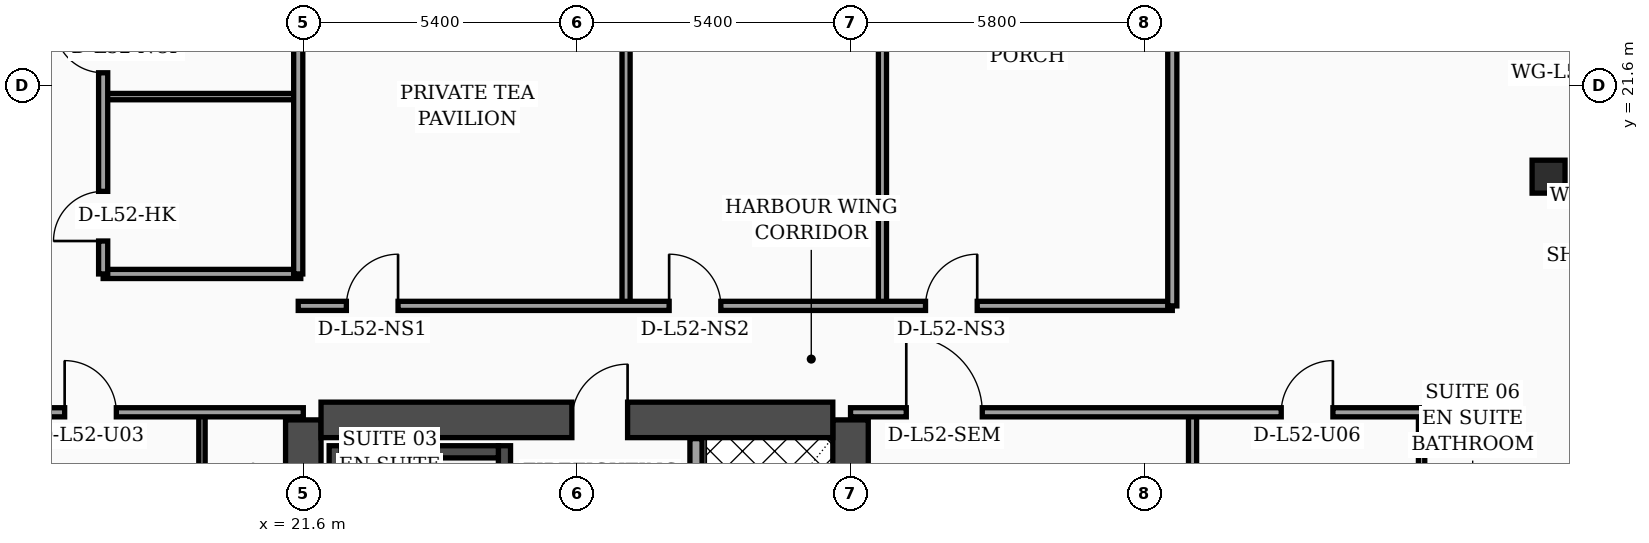
"""IFC4 building model, lengths in metres.
Left out: names, types, materials, properties, quantities, classifications, styles, units other than length and angle.
Written with IfcOpenShell. Run it as: python <this file> out.ifc"""

import sys

from ifc_helpers import new_model, si_unit, direction, frame, frame_2d, origin, origin_2d, place, context, subcontext, project, spatial, rectangle, hollow_rectangle, extrude, element, fill, save


model = new_model("IFC4")
c1 = context("Model", 3, precision=1e-05, world=origin(), true_north=direction((0.0, 1.0)))
c2 = subcontext(c1, "Body", "Model", "MODEL_VIEW")
j1 = project(units=[si_unit("LENGTHUNIT", "METRE"), si_unit("PLANEANGLEUNIT", "RADIAN")], contexts=[c1])
p1 = place(None, origin())
s1 = spatial("IfcSite", under=j1, at=p1, CompositionType="ELEMENT")
p2 = place(p1, origin())
s2 = spatial("IfcBuilding", under=s1, at=p2, CompositionType="ELEMENT")
p3 = place(p2, frame((0.0, 0.0, 211.0)))
s3 = spatial("IfcBuildingStorey", under=s2, at=p3, CompositionType="ELEMENT", Elevation=211.0)
for number, where, z_axis, x_axis in (
    (1, (21.6, 4.6, 0.0), (0.0, 0.0, 1.0), (0.0, 1.0, 0.0)),
    (2, (32.4, 4.6, 0.0), (0.0, 0.0, 1.0), (0.0, 1.0, 0.0)),
):
    element("IfcWall", number, at=place(p3, frame(where, z_axis=z_axis, x_axis=x_axis)), inside=s3, PredefinedType="SHEAR", context=c2, shape_type="SweptSolid", body=[
        extrude(rectangle(XDim=10.4, YDim=0.7, at=frame_2d((5.2, 0.0))), origin(), (0.0, 0.0, 1.0), 3.56),
    ])
p4 = place(p3, frame((21.95, 15.0, 0.0), z_axis=(0.0, 0.0, 1.0), x_axis=(1.0, 0.0, 0.0)))
e3 = element("IfcWall", 3, at=p4, inside=s3, PredefinedType="SHEAR", context=c2, shape_type="SweptSolid", body=[
    extrude(rectangle(XDim=10.1, YDim=0.7, at=frame_2d((5.05, 0.0))), origin(), (0.0, 0.0, 1.0), 3.56),
])
p5 = place(p4, frame((4.95, 0.0, 0.0)))
e4 = element("IfcOpeningElement", 4, at=p5, cuts=e3, PredefinedType="OPENING", context=c2, shape_type="SweptSolid", body=[
    extrude(rectangle(XDim=1.1, YDim=2.2, at=frame_2d((0.55, 1.1))), frame((0.0, 0.36, 0.0), z_axis=(0.0, -1.0, 0.0), x_axis=(1.0, 0.0, 0.0)), (0.0, 0.0, 1.0), 0.72),
])
p6 = place(p3, frame((22.23, 4.95, 0.0), z_axis=(0.0, 0.0, 1.0), x_axis=(0.0, 1.0, 0.0)))
e5 = element("IfcWall", 5, at=p6, inside=s3, PredefinedType="SOLIDWALL", context=c2, shape_type="SweptSolid", body=[
    extrude(rectangle(XDim=9.54, YDim=0.24, at=frame_2d((4.77, 0.0))), origin(), (0.0, 0.0, 1.0), 3.56),
])
p7 = place(p3, frame((25.57, 4.95, 0.0), z_axis=(0.0, 0.0, 1.0), x_axis=(0.0, 1.0, 0.0)))
e6 = element("IfcWall", 6, at=p7, inside=s3, PredefinedType="SOLIDWALL", context=c2, shape_type="SweptSolid", body=[
    extrude(rectangle(XDim=9.54, YDim=0.24, at=frame_2d((4.77, 0.0))), origin(), (0.0, 0.0, 1.0), 3.56),
])
p8 = place(p7, frame((0.35, 0.0, 0.0)))
e7 = element("IfcOpeningElement", 7, at=p8, cuts=e6, PredefinedType="OPENING", context=c2, shape_type="SweptSolid", body=[
    extrude(rectangle(XDim=1.15, YDim=2.2, at=frame_2d((0.575, 1.1))), frame((0.0, 0.13, 0.0), z_axis=(0.0, -1.0, 0.0), x_axis=(1.0, 0.0, 0.0)), (0.0, 0.0, 1.0), 0.26),
])
p9 = place(p3, frame((22.35, 14.37, 0.0), z_axis=(0.0, 0.0, 1.0), x_axis=(1.0, 0.0, 0.0)))
e8 = element("IfcWall", 8, at=p9, inside=s3, PredefinedType="SOLIDWALL", context=c2, shape_type="SweptSolid", body=[
    extrude(rectangle(XDim=3.1, YDim=0.24, at=frame_2d((1.55, 0.0))), origin(), (0.0, 0.0, 1.0), 3.56),
])
p10 = place(p3, frame((46.176, 19.8, 0.0), z_axis=(0.0, 0.0, 1.0), x_axis=(1.0, 0.0, 0.0)))
e9 = element("IfcColumn", 9, at=p10, inside=s3, PredefinedType="COLUMN", context=c2, shape_type="SweptSolid", body=[
    extrude(hollow_rectangle(XDim=0.65, YDim=0.65, WallThickness=0.028, at=origin_2d()), origin(), (0.0, 0.0, 1.0), 3.56),
])
p11 = place(p3, frame((52.23, 5.505, 0.0), z_axis=(0.0, 0.0, 1.0), x_axis=(-0.300509063924, 0.953778958931, 0.0)))
e10 = element("IfcWall", 10, at=p11, inside=s3, PredefinedType="SOLIDWALL", context=c2, shape_type="SweptSolid", body=[
    extrude(rectangle(XDim=30.814, YDim=0.32, at=frame_2d((15.407, 0.0))), origin(), (0.0, 0.0, 1.0), 3.56),
])
p12 = place(p11, frame((18.796, 0.0, 0.0)))
e11 = element("IfcOpeningElement", 11, at=p12, cuts=e10, PredefinedType="OPENING", context=c2, shape_type="SweptSolid", body=[
    extrude(rectangle(XDim=1.4, YDim=2.25, at=frame_2d((0.7, 1.125))), frame((0.0, 0.17, 0.0), z_axis=(0.0, -1.0, 0.0), x_axis=(1.0, 0.0, 0.0)), (0.0, 0.0, 1.0), 0.34),
])
p13 = place(p11, frame((4.437, 0.0, 0.7)))
e12 = element("IfcOpeningElement", 12, at=p13, cuts=e10, PredefinedType="OPENING", context=c2, shape_type="SweptSolid", body=[
    extrude(rectangle(XDim=1.6, YDim=1.65, at=frame_2d((0.8, 0.825))), frame((0.0, 0.17, 0.0), z_axis=(0.0, -1.0, 0.0), x_axis=(1.0, 0.0, 0.0)), (0.0, 0.0, 1.0), 0.34),
])
p14 = place(p11, frame((9.889, 0.0, 0.7)))
e13 = element("IfcOpeningElement", 13, at=p14, cuts=e10, PredefinedType="OPENING", context=c2, shape_type="SweptSolid", body=[
    extrude(rectangle(XDim=1.6, YDim=1.65, at=frame_2d((0.8, 0.825))), frame((0.0, 0.17, 0.0), z_axis=(0.0, -1.0, 0.0), x_axis=(1.0, 0.0, 0.0)), (0.0, 0.0, 1.0), 0.34),
])
p15 = place(p11, frame((1.6, 0.0, 0.75)))
e14 = element("IfcOpeningElement", 14, at=p15, cuts=e10, PredefinedType="OPENING", context=c2, shape_type="SweptSolid", body=[
    extrude(rectangle(XDim=1.5, YDim=1.6, at=frame_2d((0.75, 0.8))), frame((0.0, 0.17, 0.0), z_axis=(0.0, -1.0, 0.0), x_axis=(1.0, 0.0, 0.0)), (0.0, 0.0, 1.0), 0.34),
])
p16 = place(p11, frame((7.8, 0.0, 0.75)))
e15 = element("IfcOpeningElement", 15, at=p16, cuts=e10, PredefinedType="OPENING", context=c2, shape_type="SweptSolid", body=[
    extrude(rectangle(XDim=1.5, YDim=1.6, at=frame_2d((0.75, 0.8))), frame((0.0, 0.17, 0.0), z_axis=(0.0, -1.0, 0.0), x_axis=(1.0, 0.0, 0.0)), (0.0, 0.0, 1.0), 0.34),
])
p17 = place(p11, frame((11.95, 0.0, 0.75)))
e16 = element("IfcOpeningElement", 16, at=p17, cuts=e10, PredefinedType="OPENING", context=c2, shape_type="SweptSolid", body=[
    extrude(rectangle(XDim=1.5, YDim=1.6, at=frame_2d((0.75, 0.8))), frame((0.0, 0.17, 0.0), z_axis=(0.0, -1.0, 0.0), x_axis=(1.0, 0.0, 0.0)), (0.0, 0.0, 1.0), 0.34),
])
p18 = place(p11, frame((14.0, 0.0, 0.75)))
e17 = element("IfcOpeningElement", 17, at=p18, cuts=e10, PredefinedType="OPENING", context=c2, shape_type="SweptSolid", body=[
    extrude(rectangle(XDim=1.5, YDim=1.6, at=frame_2d((0.75, 0.8))), frame((0.0, 0.17, 0.0), z_axis=(0.0, -1.0, 0.0), x_axis=(1.0, 0.0, 0.0)), (0.0, 0.0, 1.0), 0.34),
])
p19 = place(p11, frame((16.55, 0.0, 0.75)))
e18 = element("IfcOpeningElement", 18, at=p19, cuts=e10, PredefinedType="OPENING", context=c2, shape_type="SweptSolid", body=[
    extrude(rectangle(XDim=1.5, YDim=1.6, at=frame_2d((0.75, 0.8))), frame((0.0, 0.17, 0.0), z_axis=(0.0, -1.0, 0.0), x_axis=(1.0, 0.0, 0.0)), (0.0, 0.0, 1.0), 0.34),
])
p20 = place(p11, frame((20.75, 0.0, 0.75)))
e19 = element("IfcOpeningElement", 19, at=p20, cuts=e10, PredefinedType="OPENING", context=c2, shape_type="SweptSolid", body=[
    extrude(rectangle(XDim=1.5, YDim=1.6, at=frame_2d((0.75, 0.8))), frame((0.0, 0.17, 0.0), z_axis=(0.0, -1.0, 0.0), x_axis=(1.0, 0.0, 0.0)), (0.0, 0.0, 1.0), 0.34),
])
p21 = place(p11, frame((23.3, 0.0, 0.75)))
e20 = element("IfcOpeningElement", 20, at=p21, cuts=e10, PredefinedType="OPENING", context=c2, shape_type="SweptSolid", body=[
    extrude(rectangle(XDim=1.5, YDim=1.6, at=frame_2d((0.75, 0.8))), frame((0.0, 0.17, 0.0), z_axis=(0.0, -1.0, 0.0), x_axis=(1.0, 0.0, 0.0)), (0.0, 0.0, 1.0), 0.34),
])
p22 = place(p11, frame((26.4, 0.0, 0.75)))
e21 = element("IfcOpeningElement", 21, at=p22, cuts=e10, PredefinedType="OPENING", context=c2, shape_type="SweptSolid", body=[
    extrude(rectangle(XDim=1.5, YDim=1.6, at=frame_2d((0.75, 0.8))), frame((0.0, 0.17, 0.0), z_axis=(0.0, -1.0, 0.0), x_axis=(1.0, 0.0, 0.0)), (0.0, 0.0, 1.0), 0.34),
])
p23 = place(p3, frame((29.35, 4.97, 0.0), z_axis=(0.0, 0.0, 1.0), x_axis=(0.0, 1.0, 0.0)))
e22 = element("IfcWall", 22, at=p23, inside=s3, PredefinedType="SOLIDWALL", context=c2, shape_type="SweptSolid", body=[
    extrude(rectangle(XDim=9.66, YDim=0.24, at=frame_2d((4.83, 0.0))), origin(), (0.0, 0.0, 1.0), 3.56),
])
p24 = place(p23, frame((0.55, 0.0, 0.0)))
e23 = element("IfcOpeningElement", 23, at=p24, cuts=e22, PredefinedType="OPENING", context=c2, shape_type="SweptSolid", body=[
    extrude(rectangle(XDim=1.3, YDim=2.35, at=frame_2d((0.65, 1.175))), frame((0.0, 0.13, 0.0), z_axis=(0.0, -1.0, 0.0), x_axis=(1.0, 0.0, 0.0)), (0.0, 0.0, 1.0), 0.26),
])
p25 = place(p3, frame((19.6, 2.44, 0.0), z_axis=(0.0, 0.0, 1.0), x_axis=(0.0, 1.0, 0.0)))
e24 = element("IfcWall", 24, at=p25, inside=s3, PredefinedType="PARTITIONING", context=c2, shape_type="SweptSolid", body=[
    extrude(rectangle(XDim=12.71, YDim=0.125, at=frame_2d((6.355, 0.0))), origin(), (0.0, 0.0, 1.0), 2.59),
])
p26 = place(p25, frame((4.34, 0.0, 0.0)))
e25 = element("IfcOpeningElement", 25, at=p26, cuts=e24, PredefinedType="OPENING", context=c2, shape_type="SweptSolid", body=[
    extrude(rectangle(XDim=0.96, YDim=2.2, at=frame_2d((0.48, 1.1))), frame((0.0, 0.073, 0.0), z_axis=(0.0, -1.0, 0.0), x_axis=(1.0, 0.0, 0.0)), (0.0, 0.0, 1.0), 0.145),
])
p27 = place(p25, frame((10.18, 0.0, 0.0)))
e26 = element("IfcOpeningElement", 26, at=p27, cuts=e24, PredefinedType="OPENING", context=c2, shape_type="SweptSolid", body=[
    extrude(rectangle(XDim=0.9, YDim=2.15, at=frame_2d((0.45, 1.075))), frame((0.0, 0.073, 0.0), z_axis=(0.0, -1.0, 0.0), x_axis=(1.0, 0.0, 0.0)), (0.0, 0.0, 1.0), 0.145),
])
p28 = place(p3, frame((15.15, 15.15, 0.0), z_axis=(0.0, 0.0, 1.0), x_axis=(1.0, 0.0, 0.0)))
e27 = element("IfcWall", 27, at=p28, inside=s3, PredefinedType="PARTITIONING", context=c2, shape_type="SweptSolid", body=[
    extrude(rectangle(XDim=6.45, YDim=0.18, at=frame_2d((3.225, 0.0))), origin(), (0.0, 0.0, 1.0), 2.59),
])
p29 = place(p28, frame((1.74, 0.0, 0.0)))
e28 = element("IfcOpeningElement", 28, at=p29, cuts=e27, PredefinedType="OPENING", context=c2, shape_type="SweptSolid", body=[
    extrude(rectangle(XDim=1.02, YDim=2.2, at=frame_2d((0.51, 1.1))), frame((0.0, 0.1, 0.0), z_axis=(0.0, -1.0, 0.0), x_axis=(1.0, 0.0, 0.0)), (0.0, 0.0, 1.0), 0.2),
])
p30 = place(p3, frame((17.65, 17.88, 0.0), z_axis=(0.0, 0.0, 1.0), x_axis=(1.0, 0.0, 0.0)))
e29 = element("IfcWall", 29, at=p30, inside=s3, PredefinedType="PARTITIONING", context=c2, shape_type="SweptSolid", body=[
    extrude(rectangle(XDim=3.9, YDim=0.18, at=frame_2d((1.95, 0.0))), origin(), (0.0, 0.0, 1.0), 3.56),
])
p31 = place(p3, frame((17.65, 21.38, 0.0), z_axis=(0.0, 0.0, 1.0), x_axis=(1.0, 0.0, 0.0)))
e30 = element("IfcWall", 30, at=p31, inside=s3, PredefinedType="PARTITIONING", context=c2, shape_type="SweptSolid", body=[
    extrude(rectangle(XDim=3.9, YDim=0.125, at=frame_2d((1.95, 0.0))), origin(), (0.0, 0.0, 1.0), 3.56),
])
p32 = place(p3, frame((21.5, 17.88, 0.0), z_axis=(0.0, 0.0, 1.0), x_axis=(0.0, 1.0, 0.0)))
e31 = element("IfcWall", 31, at=p32, inside=s3, PredefinedType="PARTITIONING", context=c2, shape_type="SweptSolid", body=[
    extrude(rectangle(XDim=6.44, YDim=0.18, at=frame_2d((3.22, 0.0))), origin(), (0.0, 0.0, 1.0), 3.56),
])
p33 = place(p3, frame((17.65, 17.88, 0.0), z_axis=(0.0, 0.0, 1.0), x_axis=(0.0, 1.0, 0.0)))
e32 = element("IfcWall", 32, at=p33, inside=s3, PredefinedType="PARTITIONING", context=c2, shape_type="SweptSolid", body=[
    extrude(rectangle(XDim=6.44, YDim=0.18, at=frame_2d((3.22, 0.0))), origin(), (0.0, 0.0, 1.0), 3.56),
])
p34 = place(p33, frame((0.65, 0.0, 0.0)))
e33 = element("IfcOpeningElement", 33, at=p34, cuts=e32, PredefinedType="OPENING", context=c2, shape_type="SweptSolid", body=[
    extrude(rectangle(XDim=0.98, YDim=2.15, at=frame_2d((0.49, 1.075))), frame((0.0, 0.1, 0.0), z_axis=(0.0, -1.0, 0.0), x_axis=(1.0, 0.0, 0.0)), (0.0, 0.0, 1.0), 0.2),
])
p35 = place(p33, frame((3.97, 0.0, 0.0)))
e34 = element("IfcOpeningElement", 34, at=p35, cuts=e32, PredefinedType="OPENING", context=c2, shape_type="SweptSolid", body=[
    extrude(rectangle(XDim=0.96, YDim=2.2, at=frame_2d((0.48, 1.1))), frame((0.0, 0.1, 0.0), z_axis=(0.0, -1.0, 0.0), x_axis=(1.0, 0.0, 0.0)), (0.0, 0.0, 1.0), 0.2),
])
p36 = place(p3, frame((43.67, 2.44, 0.0), z_axis=(0.0, 0.0, 1.0), x_axis=(0.0, 1.0, 0.0)))
e35 = element("IfcWall", 35, at=p36, inside=s3, PredefinedType="PARTITIONING", context=c2, shape_type="SweptSolid", body=[
    extrude(rectangle(XDim=12.71, YDim=0.125, at=frame_2d((6.355, 0.0))), origin(), (0.0, 0.0, 1.0), 3.09),
])
p37 = place(p36, frame((4.35, 0.0, 0.0)))
e36 = element("IfcOpeningElement", 36, at=p37, cuts=e35, PredefinedType="OPENING", context=c2, shape_type="SweptSolid", body=[
    extrude(rectangle(XDim=0.96, YDim=2.2, at=frame_2d((0.48, 1.1))), frame((0.0, 0.073, 0.0), z_axis=(0.0, -1.0, 0.0), x_axis=(1.0, 0.0, 0.0)), (0.0, 0.0, 1.0), 0.145),
])
p38 = place(p36, frame((10.21, 0.0, 0.0)))
e37 = element("IfcOpeningElement", 37, at=p38, cuts=e35, PredefinedType="OPENING", context=c2, shape_type="SweptSolid", body=[
    extrude(rectangle(XDim=0.9, YDim=2.15, at=frame_2d((0.45, 1.075))), frame((0.0, 0.073, 0.0), z_axis=(0.0, -1.0, 0.0), x_axis=(1.0, 0.0, 0.0)), (0.0, 0.0, 1.0), 0.145),
])
p39 = place(p3, frame((39.15, 2.44, 0.0), z_axis=(0.0, 0.0, 1.0), x_axis=(0.0, 1.0, 0.0)))
e38 = element("IfcWall", 38, at=p39, inside=s3, PredefinedType="PARTITIONING", context=c2, shape_type="SweptSolid", body=[
    extrude(rectangle(XDim=12.71, YDim=0.16, at=frame_2d((6.355, 0.0))), origin(), (0.0, 0.0, 1.0), 2.94),
])
p40 = place(p3, frame((32.4, 15.15, 0.0), z_axis=(0.0, 0.0, 1.0), x_axis=(1.0, 0.0, 0.0)))
e39 = element("IfcWall", 39, at=p40, inside=s3, PredefinedType="PARTITIONING", context=c2, shape_type="SweptSolid", body=[
    extrude(rectangle(XDim=13.2, YDim=0.18, at=frame_2d((6.6, 0.0))), origin(), (0.0, 0.0, 1.0), 2.94),
])
p41 = place(p40, frame((1.1, 0.0, 0.0)))
e40 = element("IfcOpeningElement", 40, at=p41, cuts=e39, PredefinedType="OPENING", context=c2, shape_type="SweptSolid", body=[
    extrude(rectangle(XDim=1.5, YDim=2.22, at=frame_2d((0.75, 1.11))), frame((0.0, 0.1, 0.0), z_axis=(0.0, -1.0, 0.0), x_axis=(1.0, 0.0, 0.0)), (0.0, 0.0, 1.0), 0.2),
])
p42 = place(p40, frame((8.5, 0.0, 0.0)))
e41 = element("IfcOpeningElement", 41, at=p42, cuts=e39, PredefinedType="OPENING", context=c2, shape_type="SweptSolid", body=[
    extrude(rectangle(XDim=1.02, YDim=2.2, at=frame_2d((0.51, 1.1))), frame((0.0, 0.1, 0.0), z_axis=(0.0, -1.0, 0.0), x_axis=(1.0, 0.0, 0.0)), (0.0, 0.0, 1.0), 0.2),
])
p43 = place(p3, frame((27.97, 17.25, 0.0), z_axis=(0.0, 0.0, 1.0), x_axis=(0.0, 1.0, 0.0)))
e42 = element("IfcWall", 42, at=p43, inside=s3, PredefinedType="PARTITIONING", context=c2, shape_type="SweptSolid", body=[
    extrude(rectangle(XDim=12.21, YDim=0.16, at=frame_2d((6.105, 0.0))), origin(), (0.0, 0.0, 1.0), 2.94),
])
p44 = place(p3, frame((33.03, 17.25, 0.0), z_axis=(0.0, 0.0, 1.0), x_axis=(0.0, 1.0, 0.0)))
e43 = element("IfcWall", 43, at=p44, inside=s3, PredefinedType="PARTITIONING", context=c2, shape_type="SweptSolid", body=[
    extrude(rectangle(XDim=16.16, YDim=0.16, at=frame_2d((8.08, 0.0))), origin(), (0.0, 0.0, 1.0), 2.94),
])
p45 = place(p3, frame((21.5, 17.25, 0.0), z_axis=(0.0, 0.0, 1.0), x_axis=(1.0, 0.0, 0.0)))
e44 = element("IfcWall", 44, at=p45, inside=s3, PredefinedType="PARTITIONING", context=c2, shape_type="SweptSolid", body=[
    extrude(rectangle(XDim=17.25, YDim=0.18, at=frame_2d((8.625, 0.0))), origin(), (0.0, 0.0, 1.0), 2.94),
])
p46 = place(p45, frame((0.95, 0.0, 0.0)))
e45 = element("IfcOpeningElement", 45, at=p46, cuts=e44, PredefinedType="OPENING", context=c2, shape_type="SweptSolid", body=[
    extrude(rectangle(XDim=1.02, YDim=2.2, at=frame_2d((0.51, 1.1))), frame((0.0, 0.1, 0.0), z_axis=(0.0, -1.0, 0.0), x_axis=(1.0, 0.0, 0.0)), (0.0, 0.0, 1.0), 0.2),
])
p47 = place(p45, frame((7.32, 0.0, 0.0)))
e46 = element("IfcOpeningElement", 46, at=p47, cuts=e44, PredefinedType="OPENING", context=c2, shape_type="SweptSolid", body=[
    extrude(rectangle(XDim=1.02, YDim=2.2, at=frame_2d((0.51, 1.1))), frame((0.0, 0.1, 0.0), z_axis=(0.0, -1.0, 0.0), x_axis=(1.0, 0.0, 0.0)), (0.0, 0.0, 1.0), 0.2),
])
p48 = place(p45, frame((12.38, 0.0, 0.0)))
e47 = element("IfcOpeningElement", 47, at=p48, cuts=e44, PredefinedType="OPENING", context=c2, shape_type="SweptSolid", body=[
    extrude(rectangle(XDim=1.02, YDim=2.2, at=frame_2d((0.51, 1.1))), frame((0.0, 0.1, 0.0), z_axis=(0.0, -1.0, 0.0), x_axis=(1.0, 0.0, 0.0)), (0.0, 0.0, 1.0), 0.2),
])
p49 = place(p3, frame((38.75, 17.25, 0.0), z_axis=(0.0, 0.0, 1.0), x_axis=(0.0, 1.0, 0.0)))
e48 = element("IfcWall", 48, at=p49, inside=s3, PredefinedType="PARTITIONING", context=c2, shape_type="SweptSolid", body=[
    extrude(rectangle(XDim=20.63, YDim=0.18, at=frame_2d((10.315, 0.0))), origin(), (0.0, 0.0, 1.0), 2.94),
])
p50 = place(p29, origin())
e49 = element("IfcDoor", 49, at=p50, inside=s3, OperationType="SINGLE_SWING_LEFT", PredefinedType="DOOR", context=c2, shape_type="SweptSolid", body=[
    extrude(rectangle(XDim=1.02, YDim=2.2, at=frame_2d((0.51, 1.1))), frame((0.0, 0.025, 0.0), z_axis=(0.0, -1.0, 0.0), x_axis=(1.0, 0.0, 0.0)), (0.0, 0.0, 1.0), 0.05),
])
fill(e28, e49)
p51 = place(p34, origin())
e50 = element("IfcDoor", 50, at=p51, inside=s3, OperationType="SINGLE_SWING_LEFT", PredefinedType="DOOR", context=c2, shape_type="SweptSolid", body=[
    extrude(rectangle(XDim=0.98, YDim=2.15, at=frame_2d((0.49, 1.075))), frame((0.0, 0.025, 0.0), z_axis=(0.0, -1.0, 0.0), x_axis=(1.0, 0.0, 0.0)), (0.0, 0.0, 1.0), 0.05),
])
fill(e33, e50)
p52 = place(p35, origin())
e51 = element("IfcDoor", 51, at=p52, inside=s3, OperationType="SINGLE_SWING_RIGHT", PredefinedType="DOOR", context=c2, shape_type="SweptSolid", body=[
    extrude(rectangle(XDim=0.96, YDim=2.2, at=frame_2d((0.48, 1.1))), frame((0.0, 0.025, 0.0), z_axis=(0.0, -1.0, 0.0), x_axis=(1.0, 0.0, 0.0)), (0.0, 0.0, 1.0), 0.05),
])
fill(e34, e51)
p53 = place(p41, origin())
e52 = element("IfcDoor", 52, at=p53, inside=s3, OperationType="SINGLE_SWING_LEFT", PredefinedType="DOOR", context=c2, shape_type="SweptSolid", body=[
    extrude(rectangle(XDim=1.5, YDim=2.22, at=frame_2d((0.75, 1.11))), frame((0.0, 0.025, 0.0), z_axis=(0.0, -1.0, 0.0), x_axis=(1.0, 0.0, 0.0)), (0.0, 0.0, 1.0), 0.05),
])
fill(e40, e52)
p54 = place(p42, origin())
e53 = element("IfcDoor", 53, at=p54, inside=s3, OperationType="SINGLE_SWING_RIGHT", PredefinedType="DOOR", context=c2, shape_type="SweptSolid", body=[
    extrude(rectangle(XDim=1.02, YDim=2.2, at=frame_2d((0.51, 1.1))), frame((0.0, 0.025, 0.0), z_axis=(0.0, -1.0, 0.0), x_axis=(1.0, 0.0, 0.0)), (0.0, 0.0, 1.0), 0.05),
])
fill(e41, e53)
p55 = place(p46, origin())
e54 = element("IfcDoor", 54, at=p55, inside=s3, OperationType="SINGLE_SWING_RIGHT", PredefinedType="DOOR", context=c2, shape_type="SweptSolid", body=[
    extrude(rectangle(XDim=1.02, YDim=2.2, at=frame_2d((0.51, 1.1))), frame((0.0, 0.025, 0.0), z_axis=(0.0, -1.0, 0.0), x_axis=(1.0, 0.0, 0.0)), (0.0, 0.0, 1.0), 0.05),
])
fill(e45, e54)
p56 = place(p47, origin())
e55 = element("IfcDoor", 55, at=p56, inside=s3, OperationType="SINGLE_SWING_LEFT", PredefinedType="DOOR", context=c2, shape_type="SweptSolid", body=[
    extrude(rectangle(XDim=1.02, YDim=2.2, at=frame_2d((0.51, 1.1))), frame((0.0, 0.025, 0.0), z_axis=(0.0, -1.0, 0.0), x_axis=(1.0, 0.0, 0.0)), (0.0, 0.0, 1.0), 0.05),
])
fill(e46, e55)
p57 = place(p48, origin())
e56 = element("IfcDoor", 56, at=p57, inside=s3, OperationType="SINGLE_SWING_RIGHT", PredefinedType="DOOR", context=c2, shape_type="SweptSolid", body=[
    extrude(rectangle(XDim=1.02, YDim=2.2, at=frame_2d((0.51, 1.1))), frame((0.0, 0.025, 0.0), z_axis=(0.0, -1.0, 0.0), x_axis=(1.0, 0.0, 0.0)), (0.0, 0.0, 1.0), 0.05),
])
fill(e47, e56)
p58 = place(p5, origin())
e57 = element("IfcDoor", 57, at=p58, inside=s3, OperationType="SINGLE_SWING_RIGHT", PredefinedType="DOOR", context=c2, shape_type="SweptSolid", body=[
    extrude(rectangle(XDim=1.1, YDim=2.2, at=frame_2d((0.55, 1.1))), frame((0.0, 0.025, 0.0), z_axis=(0.0, -1.0, 0.0), x_axis=(1.0, 0.0, 0.0)), (0.0, 0.0, 1.0), 0.05),
])
fill(e4, e57)
save(model, sys.argv[1])
